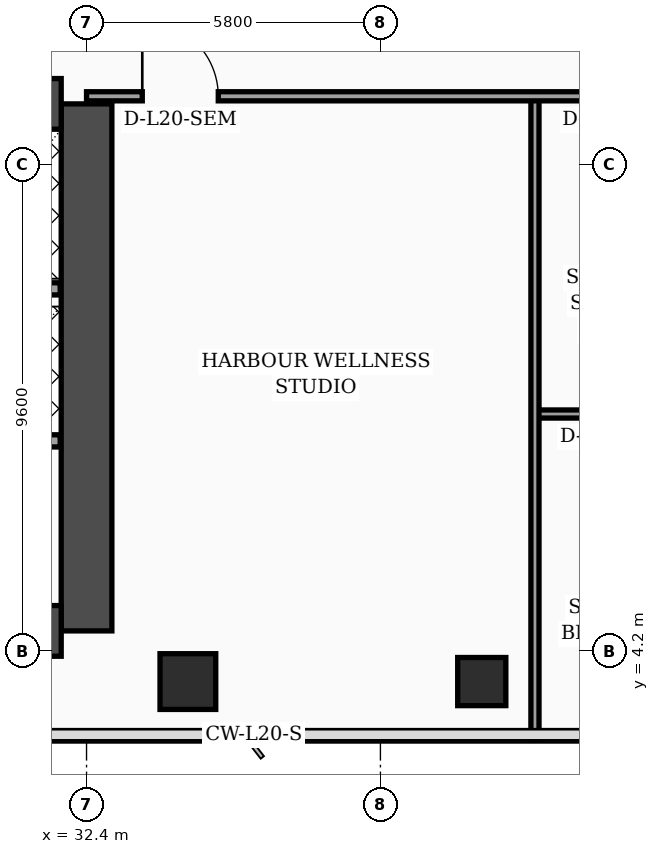
"""IFC4 building model, lengths in metres.
Left out: names, types, materials, properties, quantities, classifications, styles, units other than length and angle.
Written with IfcOpenShell. Run it as: python <this file> out.ifc"""

import sys

from ifc_helpers import new_model, si_unit, direction, frame, frame_2d, origin, origin_2d, place, context, subcontext, project, spatial, rectangle, hollow_rectangle, extrude, element, fill, save


model = new_model("IFC4")
c1 = context("Model", 3, precision=1e-05, world=origin(), true_north=direction((0.0, 1.0)))
c2 = subcontext(c1, "Body", "Model", "MODEL_VIEW")
j1 = project(units=[si_unit("LENGTHUNIT", "METRE"), si_unit("PLANEANGLEUNIT", "RADIAN")], contexts=[c1])
p1 = place(None, origin())
s1 = spatial("IfcSite", under=j1, at=p1, CompositionType="ELEMENT")
p2 = place(p1, origin())
s2 = spatial("IfcBuilding", under=s1, at=p2, CompositionType="ELEMENT")
p3 = place(p2, frame((0.0, 0.0, 85.0)))
s3 = spatial("IfcBuildingStorey", under=s2, at=p3, CompositionType="ELEMENT", Elevation=85.0)
p4 = place(p3, frame((32.4, 4.6, 0.0), z_axis=(0.0, 0.0, 1.0), x_axis=(0.0, 1.0, 0.0)))
e1 = element("IfcWall", 1, at=p4, inside=s3, PredefinedType="SHEAR", context=c2, shape_type="SweptSolid", body=[
    extrude(rectangle(XDim=10.4, YDim=1.0, at=frame_2d((5.2, 0.0))), origin(), (0.0, 0.0, 1.0), 3.56),
])
p5 = place(p3, frame((22.1, 15.0, 0.0), z_axis=(0.0, 0.0, 1.0), x_axis=(1.0, 0.0, 0.0)))
e2 = element("IfcWall", 2, at=p5, inside=s3, PredefinedType="SHEAR", context=c2, shape_type="SweptSolid", body=[
    extrude(rectangle(XDim=9.8, YDim=1.0, at=frame_2d((4.9, 0.0))), origin(), (0.0, 0.0, 1.0), 3.56),
])
p6 = place(p5, frame((4.8, 0.0, 0.0)))
e3 = element("IfcOpeningElement", 3, at=p6, cuts=e2, PredefinedType="OPENING", context=c2, shape_type="SweptSolid", body=[
    extrude(rectangle(XDim=1.1, YDim=2.2, at=frame_2d((0.55, 1.1))), frame((0.0, 0.51, 0.0), z_axis=(0.0, -1.0, 0.0), x_axis=(1.0, 0.0, 0.0)), (0.0, 0.0, 1.0), 1.02),
])
p7 = place(p3, frame((22.1, 4.6, 0.0), z_axis=(0.0, 0.0, 1.0), x_axis=(1.0, 0.0, 0.0)))
e4 = element("IfcWall", 4, at=p7, inside=s3, PredefinedType="SHEAR", context=c2, shape_type="SweptSolid", body=[
    extrude(rectangle(XDim=9.8, YDim=1.0, at=frame_2d((4.9, 0.0))), origin(), (0.0, 0.0, 1.0), 3.56),
])
p8 = place(p3, frame((34.4, 3.6, 0.0), z_axis=(0.0, 0.0, 1.0), x_axis=(1.0, 0.0, 0.0)))
e5 = element("IfcColumn", 5, at=p8, inside=s3, PredefinedType="COLUMN", context=c2, shape_type="SweptSolid", body=[
    extrude(hollow_rectangle(XDim=1.1, YDim=1.1, WallThickness=0.045, at=origin_2d()), origin(), (0.0, 0.0, 1.0), 3.56),
])
p9 = place(p3, frame((40.2, 3.6, 0.0), z_axis=(0.0, 0.0, 1.0), x_axis=(1.0, 0.0, 0.0)))
e6 = element("IfcColumn", 6, at=p9, inside=s3, PredefinedType="COLUMN", context=c2, shape_type="SweptSolid", body=[
    extrude(hollow_rectangle(XDim=0.95, YDim=0.95, WallThickness=0.04, at=origin_2d()), origin(), (0.0, 0.0, 1.0), 3.56),
])
p10 = place(p3, frame((27.02, 11.35, 0.0), z_axis=(0.0, 0.0, 1.0), x_axis=(1.0, 0.0, 0.0)))
e7 = element("IfcWall", 7, at=p10, inside=s3, PredefinedType="SOLIDWALL", context=c2, shape_type="SweptSolid", body=[
    extrude(rectangle(XDim=4.86, YDim=0.24, at=frame_2d((2.43, 0.0))), origin(), (0.0, 0.0, 1.0), 3.56),
])
p11 = place(p10, frame((0.45, 0.0, 0.0)))
e8 = element("IfcOpeningElement", 8, at=p11, cuts=e7, PredefinedType="OPENING", context=c2, shape_type="SweptSolid", body=[
    extrude(rectangle(XDim=1.3, YDim=2.35, at=frame_2d((0.65, 1.175))), frame((0.0, 0.13, 0.0), z_axis=(0.0, -1.0, 0.0), x_axis=(1.0, 0.0, 0.0)), (0.0, 0.0, 1.0), 0.26),
])
p12 = place(p3, frame((27.02, 8.35, 0.0), z_axis=(0.0, 0.0, 1.0), x_axis=(1.0, 0.0, 0.0)))
e9 = element("IfcWall", 9, at=p12, inside=s3, PredefinedType="SOLIDWALL", context=c2, shape_type="SweptSolid", body=[
    extrude(rectangle(XDim=4.86, YDim=0.24, at=frame_2d((2.43, 0.0))), origin(), (0.0, 0.0, 1.0), 3.56),
])
p13 = place(p3, frame((41.25, 8.88, 0.0), z_axis=(0.0, 0.0, 1.0), x_axis=(1.0, 0.0, 0.0)))
e10 = element("IfcWall", 10, at=p13, inside=s3, PredefinedType="PARTITIONING", context=c2, shape_type="SweptSolid", body=[
    extrude(rectangle(XDim=3.19, YDim=0.16, at=frame_2d((1.595, 0.0))), origin(), (0.0, 0.0, 1.0), 3.56),
])
p14 = place(p13, frame((1.11, 0.0, 0.0)))
e11 = element("IfcOpeningElement", 11, at=p14, cuts=e10, PredefinedType="OPENING", context=c2, shape_type="SweptSolid", body=[
    extrude(rectangle(XDim=0.96, YDim=2.2, at=frame_2d((0.48, 1.1))), frame((0.0, 0.09, 0.0), z_axis=(0.0, -1.0, 0.0), x_axis=(1.0, 0.0, 0.0)), (0.0, 0.0, 1.0), 0.18),
])
p15 = place(p3, frame((41.25, 2.44, 0.0), z_axis=(0.0, 0.0, 1.0), x_axis=(0.0, 1.0, 0.0)))
e12 = element("IfcWall", 12, at=p15, inside=s3, PredefinedType="PARTITIONING", context=c2, shape_type="SweptSolid", body=[
    extrude(rectangle(XDim=12.71, YDim=0.16, at=frame_2d((6.355, 0.0))), origin(), (0.0, 0.0, 1.0), 3.04),
])
p16 = place(p3, frame((32.4, 15.15, 0.0), z_axis=(0.0, 0.0, 1.0), x_axis=(1.0, 0.0, 0.0)))
e13 = element("IfcWall", 13, at=p16, inside=s3, PredefinedType="PARTITIONING", context=c2, shape_type="SweptSolid", body=[
    extrude(rectangle(XDim=20.85, YDim=0.18, at=frame_2d((10.425, 0.0))), origin(), (0.0, 0.0, 1.0), 2.84),
])
p17 = place(p16, frame((1.1, 0.0, 0.0)))
e14 = element("IfcOpeningElement", 14, at=p17, cuts=e13, PredefinedType="OPENING", context=c2, shape_type="SweptSolid", body=[
    extrude(rectangle(XDim=1.5, YDim=2.22, at=frame_2d((0.75, 1.11))), frame((0.0, 0.1, 0.0), z_axis=(0.0, -1.0, 0.0), x_axis=(1.0, 0.0, 0.0)), (0.0, 0.0, 1.0), 0.2),
])
p18 = place(p16, frame((9.94, 0.0, 0.0)))
e15 = element("IfcOpeningElement", 15, at=p18, cuts=e13, PredefinedType="OPENING", context=c2, shape_type="SweptSolid", body=[
    extrude(rectangle(XDim=1.02, YDim=2.2, at=frame_2d((0.51, 1.1))), frame((0.0, 0.1, 0.0), z_axis=(0.0, -1.0, 0.0), x_axis=(1.0, 0.0, 0.0)), (0.0, 0.0, 1.0), 0.2),
])
p19 = place(p16, frame((15.92, 0.0, 0.0)))
e16 = element("IfcOpeningElement", 16, at=p19, cuts=e13, PredefinedType="OPENING", context=c2, shape_type="SweptSolid", body=[
    extrude(rectangle(XDim=1.02, YDim=2.2, at=frame_2d((0.51, 1.1))), frame((0.0, 0.1, 0.0), z_axis=(0.0, -1.0, 0.0), x_axis=(1.0, 0.0, 0.0)), (0.0, 0.0, 1.0), 0.2),
])
p20 = place(p17, origin())
e17 = element("IfcDoor", 17, at=p20, inside=s3, OperationType="SINGLE_SWING_LEFT", PredefinedType="DOOR", context=c2, shape_type="SweptSolid", body=[
    extrude(rectangle(XDim=1.5, YDim=2.22, at=frame_2d((0.75, 1.11))), frame((0.0, 0.025, 0.0), z_axis=(0.0, -1.0, 0.0), x_axis=(1.0, 0.0, 0.0)), (0.0, 0.0, 1.0), 0.05),
])
fill(e14, e17)
save(model, sys.argv[1])
